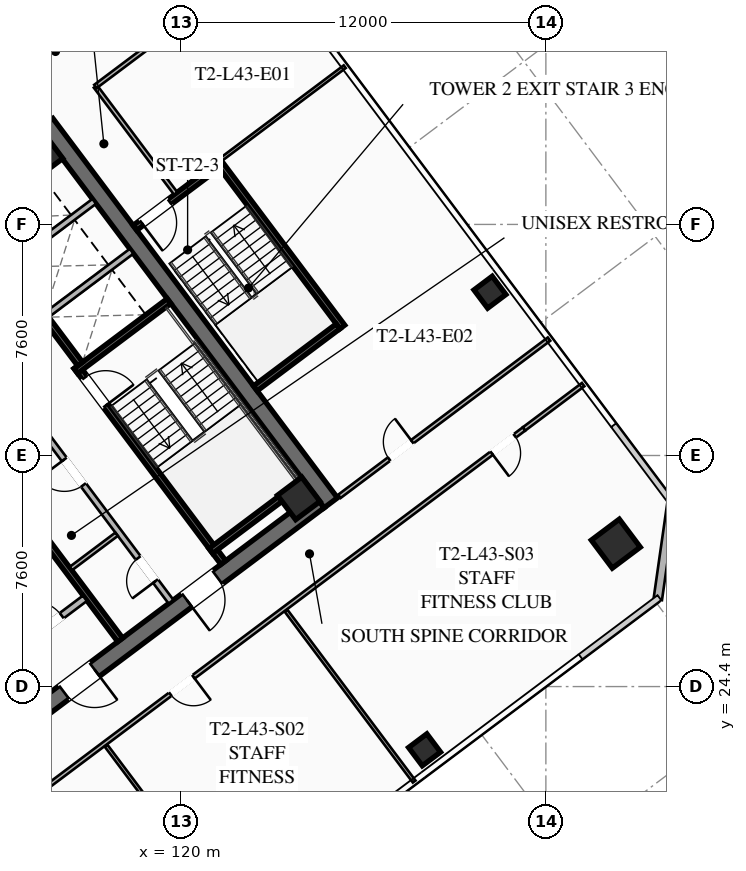
"""IFC4 building model, lengths in metres.
Left out: names, types, materials, properties, quantities, classifications, styles, units other than length and angle.
Written with IfcOpenShell. Run it as: python <this file> out.ifc"""

import sys

from ifc_helpers import new_model, si_unit, direction, frame, frame_2d, origin, origin_2d, place, context, subcontext, project, spatial, rectangle, hollow_rectangle, extrude, element, fill, save


model = new_model("IFC4")
c1 = context("Model", 3, precision=1e-05, world=origin(), true_north=direction((0.0, 1.0)))
c2 = subcontext(c1, "Body", "Model", "MODEL_VIEW")
j1 = project(units=[si_unit("LENGTHUNIT", "METRE"), si_unit("PLANEANGLEUNIT", "RADIAN")], contexts=[c1])
p1 = place(None, origin())
s1 = spatial("IfcSite", under=j1, at=p1, CompositionType="ELEMENT")
p2 = place(p1, origin())
s2 = spatial("IfcBuilding", under=s1, at=p2, CompositionType="ELEMENT")
p3 = place(p2, frame((0.0, 0.0, 160.55)))
s3 = spatial("IfcBuildingStorey", under=s2, at=p3, CompositionType="ELEMENT", Elevation=160.55)
p4 = place(p3, frame((115.564, 42.923, 0.0), z_axis=(0.0, 0.0, 1.0), x_axis=(0.600005007985, -0.799996243986, 0.0)))
e1 = element("IfcWall", 1, at=p4, inside=s3, PredefinedType="SHEAR", context=c2, shape_type="SweptSolid", body=[
    extrude(rectangle(XDim=15.6, YDim=0.55, at=frame_2d((7.8, 0.0))), origin(), (0.0, 0.0, 1.0), 3.55),
])
p5 = place(p3, frame((124.539, 30.498, 0.0), z_axis=(0.0, 0.0, 1.0), x_axis=(-0.799998054672, -0.600002593761, 0.0)))
e2 = element("IfcWall", 2, at=p5, inside=s3, PredefinedType="SHEAR", context=c2, shape_type="SweptSolid", body=[
    extrude(rectangle(XDim=15.06, YDim=0.55, at=frame_2d((7.53, 0.0))), origin(), (0.0, 0.0, 1.0), 3.55),
])
p6 = place(p5, frame((9.23, 0.0, 0.0)))
e3 = element("IfcOpeningElement", 3, at=p6, cuts=e2, PredefinedType="OPENING", context=c2, shape_type="SweptSolid", body=[
    extrude(rectangle(XDim=1.25, YDim=2.25, at=frame_2d((0.625, 1.125))), frame((0.0, 0.285, 0.0), z_axis=(0.0, -1.0, 0.0), x_axis=(1.0, 0.0, 0.0)), (0.0, 0.0, 1.0), 0.57),
])
p7 = place(p5, frame((4.18, 0.0, 0.0)))
e4 = element("IfcOpeningElement", 4, at=p7, cuts=e2, PredefinedType="OPENING", context=c2, shape_type="SweptSolid", body=[
    extrude(rectangle(XDim=1.25, YDim=2.25, at=frame_2d((0.625, 1.125))), frame((0.0, 0.285, 0.0), z_axis=(0.0, -1.0, 0.0), x_axis=(1.0, 0.0, 0.0)), (0.0, 0.0, 1.0), 0.57),
])
for number, where, z_axis, x_axis in (
    (5, (123.87, 30.59, 0.0), (0.0, 0.0, 1.0), (0.8, 0.6, 0.0)),
    (6, (115.41, 41.87, 0.0), (0.0, 0.0, 1.0), (0.8, 0.6, 0.0)),
):
    element("IfcColumn", number, at=place(p3, frame(where, z_axis=z_axis, x_axis=x_axis)), inside=s3, PredefinedType="COLUMN", context=c2, shape_type="SweptSolid", body=[
        extrude(hollow_rectangle(XDim=1.0, YDim=1.0, WallThickness=0.04, at=origin_2d()), origin(), (0.0, 0.0, 1.0), 3.37),
    ])
p8 = place(p3, frame((134.3, 29.1, 0.0), z_axis=(0.0, 0.0, 1.0), x_axis=(0.799999996291, 0.600000004945, 0.0)))
e7 = element("IfcColumn", 7, at=p8, inside=s3, PredefinedType="COLUMN", context=c2, shape_type="SweptSolid", body=[
    extrude(hollow_rectangle(XDim=1.15, YDim=1.15, WallThickness=0.045, at=origin_2d()), origin(), (0.0, 0.0, 1.0), 3.37),
])
for number, where, z_axis, x_axis in (
    (8, (128.01, 22.32, 0.0), (0.0, 0.0, 1.0), (0.8, 0.6, 0.0)),
    (9, (130.16, 37.37, 0.0), (0.0, 0.0, 1.0), (0.8, 0.6, 0.0)),
):
    element("IfcColumn", number, at=place(p3, frame(where, z_axis=z_axis, x_axis=x_axis)), inside=s3, PredefinedType="COLUMN", context=c2, shape_type="SweptSolid", body=[
        extrude(hollow_rectangle(XDim=0.75, YDim=0.75, WallThickness=0.032, at=origin_2d()), origin(), (0.0, 0.0, 1.0), 3.37),
    ])
p9 = place(p3, frame((136.14, 30.48, 0.0), z_axis=(0.0, 0.0, 1.0), x_axis=(-0.141410847992, -0.989950994782, 0.0)))
e10 = element("IfcWall", 10, at=p9, inside=s3, PredefinedType="SOLIDWALL", context=c2, shape_type="SweptSolid", body=[
    extrude(rectangle(XDim=3.253, YDim=0.28, at=frame_2d((1.626, 0.0))), origin(), (0.0, 0.0, 1.0), 3.37),
])
p10 = place(p3, frame((116.56, 34.92, 0.0), z_axis=(0.0, 0.0, 1.0), x_axis=(0.59999029481, -0.8000072788, 0.0)))
e11 = element("IfcWall", 11, at=p10, inside=s3, PredefinedType="SHEAR", context=c2, shape_type="SweptSolid", body=[
    extrude(rectangle(XDim=8.05, YDim=0.2, at=frame_2d((4.025, 0.0))), origin(), (0.0, 0.0, 1.0), 3.37),
])
p11 = place(p10, frame((0.45, 0.0, 0.0)))
e12 = element("IfcOpeningElement", 12, at=p11, cuts=e11, PredefinedType="OPENING", context=c2, shape_type="SweptSolid", body=[
    extrude(rectangle(XDim=1.15, YDim=2.2, at=frame_2d((0.575, 1.1))), frame((0.0, 0.11, 0.0), z_axis=(0.0, -1.0, 0.0), x_axis=(1.0, 0.0, 0.0)), (0.0, 0.0, 1.0), 0.22),
])
for number, where, z_axis, x_axis in (
    (13, (116.54, 34.78, 0.0), (0.0, 0.0, 1.0), (0.8, 0.6, 0.0)),
    (14, (120.98, 28.86, 0.0), (0.0, 0.0, 1.0), (0.8, 0.6, 0.0)),
):
    element("IfcWall", number, at=place(p3, frame(where, z_axis=z_axis, x_axis=x_axis)), inside=s3, PredefinedType="SHEAR", context=c2, shape_type="SweptSolid", body=[
        extrude(rectangle(XDim=3.83, YDim=0.2, at=frame_2d((1.915, 0.0))), origin(), (0.0, 0.0, 1.0), 3.37),
    ])
p12 = place(p3, frame((117.998, 25.936, 0.0), z_axis=(0.0, 0.0, 1.0), x_axis=(-0.600002693989, 0.799997979501, 0.0)))
e15 = element("IfcWall", 15, at=p12, inside=s3, PredefinedType="SHEAR", context=c2, shape_type="SweptSolid", body=[
    extrude(rectangle(XDim=14.5, YDim=0.2, at=frame_2d((7.25, 0.0))), origin(), (0.0, 0.0, 1.0), 3.37),
])
p13 = place(p3, frame((114.316, 25.412, 0.0), z_axis=(0.0, 0.0, 1.0), x_axis=(0.800018601094, 0.59997519774, 0.0)))
e16 = element("IfcWall", 16, at=p13, inside=s3, PredefinedType="SOLIDWALL", context=c2, shape_type="SweptSolid", body=[
    extrude(rectangle(XDim=3.15, YDim=0.22, at=frame_2d((1.575, 0.0))), origin(), (0.0, 0.0, 1.0), 2.723),
])
p14 = place(p13, frame((0.95, 0.0, 0.0)))
e17 = element("IfcOpeningElement", 17, at=p14, cuts=e16, PredefinedType="OPENING", context=c2, shape_type="SweptSolid", body=[
    extrude(rectangle(XDim=1.25, YDim=2.25, at=frame_2d((0.625, 1.125))), frame((0.0, 0.12, 0.0), z_axis=(0.0, -1.0, 0.0), x_axis=(1.0, 0.0, 0.0)), (0.0, 0.0, 1.0), 0.24),
])
p15 = place(p3, frame((112.81, 40.17, 0.0), z_axis=(0.0, 0.0, 1.0), x_axis=(0.599993943644, -0.800004542231, 0.0)))
e18 = element("IfcWall", 18, at=p15, inside=s3, PredefinedType="SHEAR", context=c2, shape_type="SweptSolid", body=[
    extrude(rectangle(XDim=6.45, YDim=0.2, at=frame_2d((3.225, 0.0))), origin(), (0.0, 0.0, 1.0), 3.37),
])
for number, where, z_axis, x_axis in (
    (19, (115.59, 36.63, 0.0), (0.0, 0.0, 1.0), (0.8, 0.6, 0.0)),
    (20, (114.36, 38.27, 0.0), (0.0, 0.0, 1.0), (0.8, 0.6, 0.0)),
):
    element("IfcWall", number, at=place(p3, frame(where, z_axis=z_axis, x_axis=x_axis)), inside=s3, PredefinedType="SOLIDWALL", context=c2, shape_type="SweptSolid", body=[
        extrude(rectangle(XDim=3.48, YDim=0.2, at=frame_2d((1.74, 0.0))), origin(), (0.0, 0.0, 1.0), 3.37),
    ])
p16 = place(p3, frame((119.67, 27.19, 0.0), z_axis=(0.0, 0.0, 1.0), x_axis=(-0.599988677396, 0.800008491828, 0.0)))
e21 = element("IfcWall", 21, at=p16, inside=s3, PredefinedType="SOLIDWALL", context=c2, shape_type="SweptSolid", body=[
    extrude(rectangle(XDim=6.9, YDim=0.2, at=frame_2d((3.45, 0.0))), origin(), (0.0, 0.0, 1.0), 2.723),
])
p17 = place(p16, frame((0.85, 0.0, 0.0)))
e22 = element("IfcOpeningElement", 22, at=p17, cuts=e21, PredefinedType="OPENING", context=c2, shape_type="SweptSolid", body=[
    extrude(rectangle(XDim=0.95, YDim=2.05, at=frame_2d((0.475, 1.025))), frame((0.0, 0.11, 0.0), z_axis=(0.0, -1.0, 0.0), x_axis=(1.0, 0.0, 0.0)), (0.0, 0.0, 1.0), 0.22),
])
p18 = place(p16, frame((4.8, 0.0, 0.0)))
e23 = element("IfcOpeningElement", 23, at=p18, cuts=e21, PredefinedType="OPENING", context=c2, shape_type="SweptSolid", body=[
    extrude(rectangle(XDim=1.05, YDim=2.2, at=frame_2d((0.525, 1.1))), frame((0.0, 0.11, 0.0), z_axis=(0.0, -1.0, 0.0), x_axis=(1.0, 0.0, 0.0)), (0.0, 0.0, 1.0), 0.22),
])
p19 = place(p3, frame((116.376, 28.282, 0.0), z_axis=(0.0, 0.0, 1.0), x_axis=(0.8, 0.6, 0.0)))
e24 = element("IfcWall", 24, at=p19, inside=s3, PredefinedType="PARTITIONING", context=c2, shape_type="SweptSolid", body=[
    extrude(rectangle(XDim=1.88, YDim=0.135, at=frame_2d((0.94, 0.0))), origin(), (0.0, 0.0, 1.0), 2.723),
])
p20 = place(p3, frame((125.304, 36.228, 0.0), z_axis=(0.0, 0.0, 1.0), x_axis=(-0.59998851072, 0.800008616831, 0.0)))
e25 = element("IfcWall", 25, at=p20, inside=s3, PredefinedType="SHEAR", context=c2, shape_type="SweptSolid", body=[
    extrude(rectangle(XDim=6.8, YDim=0.2, at=frame_2d((3.4, 0.0))), origin(), (0.0, 0.0, 1.0), 3.37),
])
p21 = place(p3, frame((121.204, 41.528, 0.0), z_axis=(0.0, 0.0, 1.0), x_axis=(-0.800017232136, -0.599977023131, 0.0)))
e26 = element("IfcWall", 26, at=p21, inside=s3, PredefinedType="SHEAR", context=c2, shape_type="SweptSolid", body=[
    extrude(rectangle(XDim=3.4, YDim=0.2, at=frame_2d((1.7, 0.0))), origin(), (0.0, 0.0, 1.0), 3.37),
])
p22 = place(p21, frame((1.975, 0.0, 0.0)))
e27 = element("IfcOpeningElement", 27, at=p22, cuts=e26, PredefinedType="OPENING", context=c2, shape_type="SweptSolid", body=[
    extrude(rectangle(XDim=1.15, YDim=2.2, at=frame_2d((0.575, 1.1))), frame((0.0, 0.11, 0.0), z_axis=(0.0, -1.0, 0.0), x_axis=(1.0, 0.0, 0.0)), (0.0, 0.0, 1.0), 0.22),
])
p23 = place(p3, frame((122.444, 34.208, 0.0), z_axis=(0.0, 0.0, 1.0), x_axis=(0.79999138319, 0.600011488909, 0.0)))
e28 = element("IfcWall", 28, at=p23, inside=s3, PredefinedType="SHEAR", context=c2, shape_type="SweptSolid", body=[
    extrude(rectangle(XDim=3.4, YDim=0.2, at=frame_2d((1.7, 0.0))), origin(), (0.0, 0.0, 1.0), 3.37),
])
p24 = place(p3, frame((119.824, 40.618, 0.0), z_axis=(0.0, 0.0, 1.0), x_axis=(-0.599982243973, 0.800013316712, 0.0)))
e29 = element("IfcWall", 29, at=p24, inside=s3, PredefinedType="PARTITIONING", context=c2, shape_type="SweptSolid", body=[
    extrude(rectangle(XDim=4.4, YDim=0.135, at=frame_2d((2.2, 0.0))), origin(), (0.0, 0.0, 1.0), 2.723),
])
p25 = place(p3, frame((95.8, 32.35, 0.0), z_axis=(0.0, 0.0, 1.0), x_axis=(0.8, 0.6, 0.0)))
e30 = element("IfcWall", 30, at=p25, inside=s3, PredefinedType="PARTITIONING", context=c2, shape_type="SweptSolid", body=[
    extrude(rectangle(XDim=28.7, YDim=0.135, at=frame_2d((14.35, 0.0))), origin(), (0.0, 0.0, 1.0), 2.723),
])
p26 = place(p25, frame((0.3, 0.0, 0.0)))
e31 = element("IfcOpeningElement", 31, at=p26, cuts=e30, PredefinedType="OPENING", context=c2, shape_type="SweptSolid", body=[
    extrude(rectangle(XDim=0.95, YDim=2.05, at=frame_2d((0.475, 1.025))), frame((0.0, 0.077, 0.0), z_axis=(0.0, -1.0, 0.0), x_axis=(1.0, 0.0, 0.0)), (0.0, 0.0, 1.0), 0.155),
])
p27 = place(p25, frame((9.959, 0.0, 0.0)))
e32 = element("IfcOpeningElement", 32, at=p27, cuts=e30, PredefinedType="OPENING", context=c2, shape_type="SweptSolid", body=[
    extrude(rectangle(XDim=0.95, YDim=2.05, at=frame_2d((0.475, 1.025))), frame((0.0, 0.077, 0.0), z_axis=(0.0, -1.0, 0.0), x_axis=(1.0, 0.0, 0.0)), (0.0, 0.0, 1.0), 0.155),
])
p28 = place(p25, frame((14.005, 0.0, 0.0)))
e33 = element("IfcOpeningElement", 33, at=p28, cuts=e30, PredefinedType="OPENING", context=c2, shape_type="SweptSolid", body=[
    extrude(rectangle(XDim=0.95, YDim=2.05, at=frame_2d((0.475, 1.025))), frame((0.0, 0.077, 0.0), z_axis=(0.0, -1.0, 0.0), x_axis=(1.0, 0.0, 0.0)), (0.0, 0.0, 1.0), 0.155),
])
p29 = place(p25, frame((18.049, 0.0, 0.0)))
e34 = element("IfcOpeningElement", 34, at=p29, cuts=e30, PredefinedType="OPENING", context=c2, shape_type="SweptSolid", body=[
    extrude(rectangle(XDim=0.95, YDim=2.05, at=frame_2d((0.475, 1.025))), frame((0.0, 0.077, 0.0), z_axis=(0.0, -1.0, 0.0), x_axis=(1.0, 0.0, 0.0)), (0.0, 0.0, 1.0), 0.155),
])
p30 = place(p25, frame((27.45, 0.0, 0.0)))
e35 = element("IfcOpeningElement", 35, at=p30, cuts=e30, PredefinedType="OPENING", context=c2, shape_type="SweptSolid", body=[
    extrude(rectangle(XDim=0.95, YDim=2.05, at=frame_2d((0.475, 1.025))), frame((0.0, 0.077, 0.0), z_axis=(0.0, -1.0, 0.0), x_axis=(1.0, 0.0, 0.0)), (0.0, 0.0, 1.0), 0.155),
])
p31 = place(p3, frame((131.282, 32.874, 0.0), z_axis=(0.0, 0.0, 1.0), x_axis=(-0.8, -0.6, 0.0)))
e36 = element("IfcWall", 36, at=p31, inside=s3, PredefinedType="PARTITIONING", context=c2, shape_type="SweptSolid", body=[
    extrude(rectangle(XDim=28.7, YDim=0.135, at=frame_2d((14.35, 0.0))), origin(), (0.0, 0.0, 1.0), 2.723),
])
p32 = place(p31, frame((27.37, 0.0, 0.0)))
e37 = element("IfcOpeningElement", 37, at=p32, cuts=e36, PredefinedType="OPENING", context=c2, shape_type="SweptSolid", body=[
    extrude(rectangle(XDim=0.95, YDim=2.05, at=frame_2d((0.475, 1.025))), frame((0.0, 0.077, 0.0), z_axis=(0.0, -1.0, 0.0), x_axis=(1.0, 0.0, 0.0)), (0.0, 0.0, 1.0), 0.155),
])
p33 = place(p31, frame((13.592, 0.0, 0.0)))
e38 = element("IfcOpeningElement", 38, at=p33, cuts=e36, PredefinedType="OPENING", context=c2, shape_type="SweptSolid", body=[
    extrude(rectangle(XDim=0.95, YDim=2.05, at=frame_2d((0.475, 1.025))), frame((0.0, 0.077, 0.0), z_axis=(0.0, -1.0, 0.0), x_axis=(1.0, 0.0, 0.0)), (0.0, 0.0, 1.0), 0.155),
])
p34 = place(p31, frame((0.38, 0.0, 0.0)))
e39 = element("IfcOpeningElement", 39, at=p34, cuts=e36, PredefinedType="OPENING", context=c2, shape_type="SweptSolid", body=[
    extrude(rectangle(XDim=0.95, YDim=2.05, at=frame_2d((0.475, 1.025))), frame((0.0, 0.077, 0.0), z_axis=(0.0, -1.0, 0.0), x_axis=(1.0, 0.0, 0.0)), (0.0, 0.0, 1.0), 0.155),
])
p35 = place(p3, frame((131.282, 32.874, 0.0), z_axis=(0.0, 0.0, 1.0), x_axis=(0.800012055778, 0.599983925293, 0.0)))
e40 = element("IfcWall", 40, at=p35, inside=s3, PredefinedType="PARTITIONING", context=c2, shape_type="SweptSolid", body=[
    extrude(rectangle(XDim=2.43, YDim=0.135, at=frame_2d((1.215, 0.0))), origin(), (0.0, 0.0, 1.0), 2.723),
])
for number, where, z_axis, x_axis in (
    (41, (121.748, 16.836, 0.0), (0.0, 0.0, 1.0), (-0.6, 0.8, 0.0)),
    (42, (127.668, 21.276, 0.0), (0.0, 0.0, 1.0), (-0.6, 0.8, 0.0)),
):
    element("IfcWall", number, at=place(p3, frame(where, z_axis=z_axis, x_axis=x_axis)), inside=s3, PredefinedType="PARTITIONING", context=c2, shape_type="SweptSolid", body=[
        extrude(rectangle(XDim=7.03, YDim=0.11, at=frame_2d((3.515, 0.0))), origin(), (0.0, 0.0, 1.0), 2.723),
    ])
p36 = place(p3, frame((122.744, 48.308, 0.0), z_axis=(0.0, 0.0, 1.0), x_axis=(-0.79997892247, -0.600028102345, 0.0)))
e43 = element("IfcWall", 43, at=p36, inside=s3, PredefinedType="PARTITIONING", context=c2, shape_type="SweptSolid", body=[
    extrude(rectangle(XDim=6.95, YDim=0.135, at=frame_2d((3.475, 0.0))), origin(), (0.0, 0.0, 1.0), 2.723),
])
p37 = place(p36, frame((3.35, 0.0, 0.0)))
e44 = element("IfcOpeningElement", 44, at=p37, cuts=e43, PredefinedType="OPENING", context=c2, shape_type="SweptSolid", body=[
    extrude(rectangle(XDim=0.95, YDim=2.05, at=frame_2d((0.475, 1.025))), frame((0.0, 0.077, 0.0), z_axis=(0.0, -1.0, 0.0), x_axis=(1.0, 0.0, 0.0)), (0.0, 0.0, 1.0), 0.155),
])
p38 = place(p3, frame((125.208, 30.656, 0.0), z_axis=(0.0, 0.0, 1.0), x_axis=(0.800006797429, 0.599990936654, 0.0)))
e45 = element("IfcWall", 45, at=p38, inside=s3, PredefinedType="PARTITIONING", context=c2, shape_type="SweptSolid", body=[
    extrude(rectangle(XDim=8.62, YDim=0.135, at=frame_2d((4.31, 0.0))), origin(), (0.0, 0.0, 1.0), 2.723),
])
p39 = place(p38, frame((2.045, 0.0, 0.0)))
e46 = element("IfcOpeningElement", 46, at=p39, cuts=e45, PredefinedType="OPENING", context=c2, shape_type="SweptSolid", body=[
    extrude(rectangle(XDim=0.95, YDim=2.05, at=frame_2d((0.475, 1.025))), frame((0.0, 0.077, 0.0), z_axis=(0.0, -1.0, 0.0), x_axis=(1.0, 0.0, 0.0)), (0.0, 0.0, 1.0), 0.155),
])
p40 = place(p3, frame((125.384, 44.788, 0.0), z_axis=(0.0, 0.0, 1.0), x_axis=(-0.8, -0.6, 0.0)))
e47 = element("IfcWall", 47, at=p40, inside=s3, PredefinedType="PARTITIONING", context=c2, shape_type="SweptSolid", body=[
    extrude(rectangle(XDim=5.1, YDim=0.11, at=frame_2d((2.55, 0.0))), origin(), (0.0, 0.0, 1.0), 2.723),
])
p41 = place(p6, origin())
e48 = element("IfcDoor", 48, at=p41, inside=s3, OperationType="SINGLE_SWING_LEFT", PredefinedType="DOOR", context=c2, shape_type="SweptSolid", body=[
    extrude(rectangle(XDim=1.25, YDim=2.25, at=frame_2d((0.625, 1.125))), frame((0.0, 0.025, 0.0), z_axis=(0.0, -1.0, 0.0), x_axis=(1.0, 0.0, 0.0)), (0.0, 0.0, 1.0), 0.05),
])
fill(e3, e48)
p42 = place(p7, origin())
e49 = element("IfcDoor", 49, at=p42, inside=s3, OperationType="SINGLE_SWING_RIGHT", PredefinedType="DOOR", context=c2, shape_type="SweptSolid", body=[
    extrude(rectangle(XDim=1.25, YDim=2.25, at=frame_2d((0.625, 1.125))), frame((0.0, 0.025, 0.0), z_axis=(0.0, -1.0, 0.0), x_axis=(1.0, 0.0, 0.0)), (0.0, 0.0, 1.0), 0.05),
])
fill(e4, e49)
p43 = place(p11, origin())
e50 = element("IfcDoor", 50, at=p43, inside=s3, OperationType="SINGLE_SWING_RIGHT", PredefinedType="DOOR", context=c2, shape_type="SweptSolid", body=[
    extrude(rectangle(XDim=1.15, YDim=2.2, at=frame_2d((0.575, 1.1))), frame((0.0, 0.025, 0.0), z_axis=(0.0, -1.0, 0.0), x_axis=(1.0, 0.0, 0.0)), (0.0, 0.0, 1.0), 0.05),
])
fill(e12, e50)
p44 = place(p14, origin())
e51 = element("IfcDoor", 51, at=p44, inside=s3, OperationType="SINGLE_SWING_LEFT", PredefinedType="DOOR", context=c2, shape_type="SweptSolid", body=[
    extrude(rectangle(XDim=1.25, YDim=2.25, at=frame_2d((0.625, 1.125))), frame((0.0, 0.025, 0.0), z_axis=(0.0, -1.0, 0.0), x_axis=(1.0, 0.0, 0.0)), (0.0, 0.0, 1.0), 0.05),
])
fill(e17, e51)
p45 = place(p17, origin())
e52 = element("IfcDoor", 52, at=p45, inside=s3, OperationType="SINGLE_SWING_LEFT", PredefinedType="DOOR", context=c2, shape_type="SweptSolid", body=[
    extrude(rectangle(XDim=0.95, YDim=2.05, at=frame_2d((0.475, 1.025))), frame((0.0, 0.025, 0.0), z_axis=(0.0, -1.0, 0.0), x_axis=(1.0, 0.0, 0.0)), (0.0, 0.0, 1.0), 0.05),
])
fill(e22, e52)
p46 = place(p18, origin())
e53 = element("IfcDoor", 53, at=p46, inside=s3, OperationType="SINGLE_SWING_RIGHT", PredefinedType="DOOR", context=c2, shape_type="SweptSolid", body=[
    extrude(rectangle(XDim=1.05, YDim=2.2, at=frame_2d((0.525, 1.1))), frame((0.0, 0.025, 0.0), z_axis=(0.0, -1.0, 0.0), x_axis=(1.0, 0.0, 0.0)), (0.0, 0.0, 1.0), 0.05),
])
fill(e23, e53)
p47 = place(p22, origin())
e54 = element("IfcDoor", 54, at=p47, inside=s3, OperationType="SINGLE_SWING_RIGHT", PredefinedType="DOOR", context=c2, shape_type="SweptSolid", body=[
    extrude(rectangle(XDim=1.15, YDim=2.2, at=frame_2d((0.575, 1.1))), frame((0.0, 0.025, 0.0), z_axis=(0.0, -1.0, 0.0), x_axis=(1.0, 0.0, 0.0)), (0.0, 0.0, 1.0), 0.05),
])
fill(e27, e54)
p48 = place(p33, origin())
e55 = element("IfcDoor", 55, at=p48, inside=s3, OperationType="SINGLE_SWING_LEFT", PredefinedType="DOOR", context=c2, shape_type="SweptSolid", body=[
    extrude(rectangle(XDim=0.95, YDim=2.05, at=frame_2d((0.475, 1.025))), frame((0.0, 0.025, 0.0), z_axis=(0.0, -1.0, 0.0), x_axis=(1.0, 0.0, 0.0)), (0.0, 0.0, 1.0), 0.05),
])
fill(e38, e55)
p49 = place(p34, origin())
e56 = element("IfcDoor", 56, at=p49, inside=s3, OperationType="SINGLE_SWING_RIGHT", PredefinedType="DOOR", context=c2, shape_type="SweptSolid", body=[
    extrude(rectangle(XDim=0.95, YDim=2.05, at=frame_2d((0.475, 1.025))), frame((0.0, 0.025, 0.0), z_axis=(0.0, -1.0, 0.0), x_axis=(1.0, 0.0, 0.0)), (0.0, 0.0, 1.0), 0.05),
])
fill(e39, e56)
p50 = place(p39, origin())
e57 = element("IfcDoor", 57, at=p50, inside=s3, OperationType="SINGLE_SWING_RIGHT", PredefinedType="DOOR", context=c2, shape_type="SweptSolid", body=[
    extrude(rectangle(XDim=0.95, YDim=2.05, at=frame_2d((0.475, 1.025))), frame((0.0, 0.025, 0.0), z_axis=(0.0, -1.0, 0.0), x_axis=(1.0, 0.0, 0.0)), (0.0, 0.0, 1.0), 0.05),
])
fill(e46, e57)
save(model, sys.argv[1])
